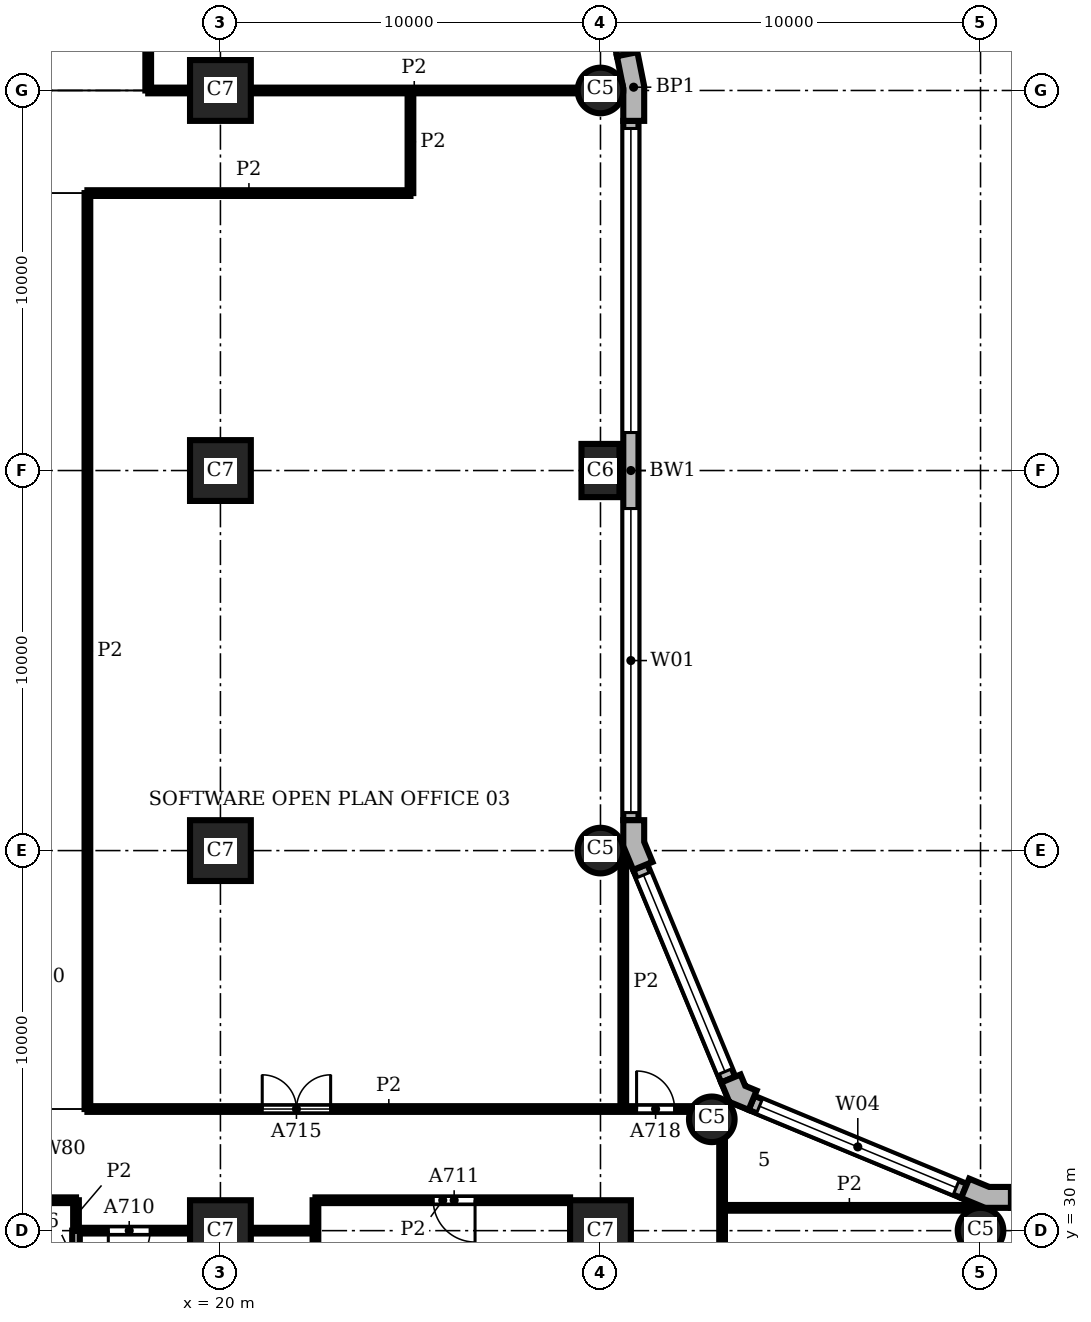
"""IFC4 building model, lengths in metres.
Left out: names, types, materials, properties, quantities, classifications, styles, units other than length and angle.
Written with IfcOpenShell. Run it as: python <this file> out.ifc"""

import sys

from ifc_helpers import new_model, si_unit, direction, frame, frame_2d, origin, origin_2d, place, context, subcontext, project, spatial, polyline, rectangle, circle, outline, extrude, element, fill, save


model = new_model("IFC4")
c1 = context("Model", 3, precision=1e-05, world=origin(), true_north=direction((0.0, 1.0)))
c2 = subcontext(c1, "Body", "Model", "MODEL_VIEW")
j1 = project(units=[si_unit("LENGTHUNIT", "METRE"), si_unit("PLANEANGLEUNIT", "RADIAN")], contexts=[c1])
p1 = place(None, origin())
s1 = spatial("IfcSite", under=j1, at=p1, CompositionType="ELEMENT")
p2 = place(p1, origin())
s2 = spatial("IfcBuilding", under=s1, at=p2, CompositionType="ELEMENT")
p3 = place(p2, frame((0.0, 0.0, 86.1)))
s3 = spatial("IfcBuildingStorey", under=s2, at=p3, CompositionType="ELEMENT", Elevation=86.1)
for number, where, z_axis, x_axis in (
    (1, (40.0, 30.0, 0.0), (0.0, 0.0, 1.0), (1.0, 0.0, 0.0)),
    (2, (32.929, 32.929, 0.0), (0.0, 0.0, 1.0), (1.0, 0.0, 0.0)),
    (3, (30.0, 40.0, 0.0), (0.0, 0.0, 1.0), (1.0, 0.0, 0.0)),
):
    element("IfcColumn", number, at=place(p3, frame(where, z_axis=z_axis, x_axis=x_axis)), inside=s3, PredefinedType="COLUMN", context=c2, shape_type="SweptSolid", body=[
        extrude(circle(Radius=0.6, at=origin_2d()), origin(), (0.0, 0.0, 1.0), 3.9),
    ])
p4 = place(p3, frame((30.0, 50.0, 0.0), z_axis=(0.0, 0.0, 1.0), x_axis=(0.0, 1.0, 0.0)))
e4 = element("IfcColumn", 4, at=p4, inside=s3, PredefinedType="COLUMN", context=c2, shape_type="SweptSolid", body=[
    extrude(rectangle(XDim=1.4, YDim=1.0, at=origin_2d()), origin(), (0.0, 0.0, 1.0), 3.9),
])
p5 = place(p3, frame((30.0, 60.0, 0.0), z_axis=(0.0, 0.0, 1.0), x_axis=(1.0, 0.0, 0.0)))
e5 = element("IfcColumn", 5, at=p5, inside=s3, PredefinedType="COLUMN", context=c2, shape_type="SweptSolid", body=[
    extrude(circle(Radius=0.6, at=origin_2d()), origin(), (0.0, 0.0, 1.0), 3.9),
])
for number, where, z_axis, x_axis in (
    (6, (20.0, 30.0, 0.0), (0.0, 0.0, 1.0), (1.0, 0.0, 0.0)),
    (7, (20.0, 40.0, 0.0), (0.0, 0.0, 1.0), (1.0, 0.0, 0.0)),
    (8, (20.0, 50.0, 0.0), (0.0, 0.0, 1.0), (1.0, 0.0, 0.0)),
    (9, (20.0, 60.0, 0.0), (0.0, 0.0, 1.0), (1.0, 0.0, 0.0)),
    (10, (30.0, 30.0, 0.0), (0.0, 0.0, 1.0), (1.0, 0.0, 0.0)),
):
    element("IfcColumn", number, at=place(p3, frame(where, z_axis=z_axis, x_axis=x_axis)), inside=s3, PredefinedType="COLUMN", context=c2, shape_type="SweptSolid", body=[
        extrude(rectangle(XDim=1.6, YDim=1.6, at=origin_2d()), origin(), (0.0, 0.0, 1.0), 3.9),
    ])
p6 = place(p3, origin())
e11 = element("IfcWall", 11, at=p6, inside=s3, PredefinedType="SOLIDWALL", context=c2, shape_type="SweptSolid", body=[
    extrude(outline(polyline([(40.8, 31.0), (40.8, 31.15), (40.229, 31.15), (39.701, 31.369), (39.644, 31.23), (39.49, 30.861), (40.119, 30.6), (40.8, 30.6), (40.8, 31.0)])), origin(), (0.0, 0.0, 1.0), 3.9),
])
e12 = element("IfcWall", 12, at=p6, inside=s3, PredefinedType="SOLIDWALL", context=c2, shape_type="SweptSolid", body=[
    extrude(outline(polyline([(34.051, 33.547), (34.108, 33.685), (33.809, 33.809), (33.685, 34.108), (33.547, 34.051), (33.177, 33.898), (33.388, 33.388), (33.898, 33.177), (34.051, 33.547)])), origin(), (0.0, 0.0, 1.0), 3.9),
])
e13 = element("IfcWall", 13, at=p6, inside=s3, PredefinedType="SOLIDWALL", context=c2, shape_type="SweptSolid", body=[
    extrude(outline(polyline([(31.23, 39.644), (31.369, 39.701), (31.15, 40.229), (31.15, 40.8), (31.0, 40.8), (30.6, 40.8), (30.6, 40.119), (30.861, 39.49), (31.23, 39.644)])), origin(), (0.0, 0.0, 1.0), 3.9),
])
e14 = element("IfcWall", 14, at=p6, inside=s3, PredefinedType="SOLIDWALL", context=c2, shape_type="SweptSolid", body=[
    extrude(outline(polyline([(31.0, 59.2), (31.15, 59.2), (31.15, 60.113), (30.972, 61.009), (30.825, 60.98), (30.432, 60.902), (30.6, 60.059), (30.6, 59.2), (31.0, 59.2)])), origin(), (0.0, 0.0, 1.0), 3.9),
])
p7 = place(p3, frame((69.2, 30.8, 0.0), z_axis=(0.0, 0.0, 1.0), x_axis=(-1.0, 0.0, 0.0)))
e15 = element("IfcWall", 15, at=p7, inside=s3, PredefinedType="SOLIDWALL", context=c2, shape_type="SweptSolid", body=[
    extrude(rectangle(XDim=28.4, YDim=0.4, at=frame_2d((14.2, 0.0))), origin(), (0.0, 0.0, 1.0), 3.9),
])
p8 = place(p7, frame((0.2, 0.0, 0.9)))
e16 = element("IfcOpeningElement", 16, at=p8, cuts=e15, PredefinedType="OPENING", context=c2, shape_type="SweptSolid", body=[
    extrude(rectangle(XDim=8.0, YDim=2.35, at=frame_2d((4.0, 1.175))), frame((0.0, 0.21, 0.0), z_axis=(0.0, -1.0, 0.0), x_axis=(1.0, 0.0, 0.0)), (0.0, 0.0, 1.0), 0.42),
])
p9 = place(p7, frame((10.2, 0.0, 0.9)))
e17 = element("IfcOpeningElement", 17, at=p9, cuts=e15, PredefinedType="OPENING", context=c2, shape_type="SweptSolid", body=[
    extrude(rectangle(XDim=8.0, YDim=2.35, at=frame_2d((4.0, 1.175))), frame((0.0, 0.21, 0.0), z_axis=(0.0, -1.0, 0.0), x_axis=(1.0, 0.0, 0.0)), (0.0, 0.0, 1.0), 0.42),
])
p10 = place(p7, frame((20.2, 0.0, 0.9)))
e18 = element("IfcOpeningElement", 18, at=p10, cuts=e15, PredefinedType="OPENING", context=c2, shape_type="SweptSolid", body=[
    extrude(rectangle(XDim=8.0, YDim=2.35, at=frame_2d((4.0, 1.175))), frame((0.0, 0.21, 0.0), z_axis=(0.0, -1.0, 0.0), x_axis=(1.0, 0.0, 0.0)), (0.0, 0.0, 1.0), 0.42),
])
p11 = place(p3, frame((39.567, 31.045, 0.0), z_axis=(0.0, 0.0, 1.0), x_axis=(-0.923891000409, 0.382655745237, 0.0)))
e19 = element("IfcWall", 19, at=p11, inside=s3, PredefinedType="SOLIDWALL", context=c2, shape_type="SweptSolid", body=[
    extrude(rectangle(XDim=6.053, YDim=0.4, at=frame_2d((3.027, 0.0))), origin(), (0.0, 0.0, 1.0), 3.9),
])
p12 = place(p11, frame((0.227, 0.0, 0.9)))
e20 = element("IfcOpeningElement", 20, at=p12, cuts=e19, PredefinedType="OPENING", context=c2, shape_type="SweptSolid", body=[
    extrude(rectangle(XDim=5.6, YDim=2.35, at=frame_2d((2.8, 1.175))), frame((0.0, 0.21, 0.0), z_axis=(0.0, -1.0, 0.0), x_axis=(1.0, 0.0, 0.0)), (0.0, 0.0, 1.0), 0.42),
])
p13 = place(p3, frame((33.362, 33.974, 0.0), z_axis=(0.0, 0.0, 1.0), x_axis=(-0.382655745237, 0.923891000409, 0.0)))
e21 = element("IfcWall", 21, at=p13, inside=s3, PredefinedType="SOLIDWALL", context=c2, shape_type="SweptSolid", body=[
    extrude(rectangle(XDim=6.053, YDim=0.4, at=frame_2d((3.027, 0.0))), origin(), (0.0, 0.0, 1.0), 3.9),
])
p14 = place(p13, frame((0.227, 0.0, 0.9)))
e22 = element("IfcOpeningElement", 22, at=p14, cuts=e21, PredefinedType="OPENING", context=c2, shape_type="SweptSolid", body=[
    extrude(rectangle(XDim=5.6, YDim=2.35, at=frame_2d((2.8, 1.175))), frame((0.0, 0.21, 0.0), z_axis=(0.0, -1.0, 0.0), x_axis=(1.0, 0.0, 0.0)), (0.0, 0.0, 1.0), 0.42),
])
p15 = place(p3, frame((30.8, 40.8, 0.0), z_axis=(0.0, 0.0, 1.0), x_axis=(0.0, 1.0, 0.0)))
e23 = element("IfcWall", 23, at=p15, inside=s3, PredefinedType="SOLIDWALL", context=c2, shape_type="SweptSolid", body=[
    extrude(rectangle(XDim=18.4, YDim=0.4, at=frame_2d((9.2, 0.0))), origin(), (0.0, 0.0, 1.0), 3.9),
])
p16 = place(p15, frame((0.2, 0.0, 0.9)))
e24 = element("IfcOpeningElement", 24, at=p16, cuts=e23, PredefinedType="OPENING", context=c2, shape_type="SweptSolid", body=[
    extrude(rectangle(XDim=8.0, YDim=2.35, at=frame_2d((4.0, 1.175))), frame((0.0, 0.21, 0.0), z_axis=(0.0, -1.0, 0.0), x_axis=(1.0, 0.0, 0.0)), (0.0, 0.0, 1.0), 0.42),
])
p17 = place(p15, frame((10.2, 0.0, 0.9)))
e25 = element("IfcOpeningElement", 25, at=p17, cuts=e23, PredefinedType="OPENING", context=c2, shape_type="SweptSolid", body=[
    extrude(rectangle(XDim=8.0, YDim=2.35, at=frame_2d((4.0, 1.175))), frame((0.0, 0.21, 0.0), z_axis=(0.0, -1.0, 0.0), x_axis=(1.0, 0.0, 0.0)), (0.0, 0.0, 1.0), 0.42),
])
p18 = place(p3, frame((30.629, 60.941, 0.0), z_axis=(0.0, 0.0, 1.0), x_axis=(-0.195098533057, 0.98078364709, 0.0)))
e26 = element("IfcWall", 26, at=p18, inside=s3, PredefinedType="SOLIDWALL", context=c2, shape_type="SweptSolid", body=[
    extrude(rectangle(XDim=4.753, YDim=0.4, at=frame_2d((2.376, 0.0))), origin(), (0.0, 0.0, 1.0), 3.9),
])
p19 = place(p18, frame((0.226, 0.0, 0.9)))
e27 = element("IfcOpeningElement", 27, at=p19, cuts=e26, PredefinedType="OPENING", context=c2, shape_type="SweptSolid", body=[
    extrude(rectangle(XDim=4.3, YDim=2.35, at=frame_2d((2.15, 1.175))), frame((0.0, 0.21, 0.0), z_axis=(0.0, -1.0, 0.0), x_axis=(1.0, 0.0, 0.0)), (0.0, 0.0, 1.0), 0.42),
])
p20 = place(p3, frame((16.2, 30.0, 0.0), z_axis=(0.0, 0.0, 1.0), x_axis=(0.0, 1.0, 0.0)))
e28 = element("IfcWall", 28, at=p20, inside=s3, PredefinedType="PARTITIONING", context=c2, shape_type="SweptSolid", body=[
    extrude(rectangle(XDim=0.8, YDim=0.15, at=frame_2d((0.4, 0.0))), origin(), (0.0, 0.0, 1.0), 3.58),
])
p21 = place(p3, frame((16.5, 33.2, 0.0), z_axis=(0.0, 0.0, 1.0), x_axis=(0.0, 1.0, 0.0)))
e29 = element("IfcWall", 29, at=p21, inside=s3, PredefinedType="PARTITIONING", context=c2, shape_type="SweptSolid", body=[
    extrude(rectangle(XDim=24.1, YDim=0.15, at=frame_2d((12.05, 0.0))), origin(), (0.0, 0.0, 1.0), 3.58),
])
p22 = place(p3, frame((18.1, 60.0, 0.0), z_axis=(0.0, 0.0, 1.0), x_axis=(0.0, 1.0, 0.0)))
e30 = element("IfcWall", 30, at=p22, inside=s3, PredefinedType="PARTITIONING", context=c2, shape_type="SweptSolid", body=[
    extrude(rectangle(XDim=6.4, YDim=0.15, at=frame_2d((3.2, 0.0))), origin(), (0.0, 0.0, 1.0), 3.58),
])
p23 = place(p22, frame((1.85, 0.0, 0.0)))
e31 = element("IfcOpeningElement", 31, at=p23, cuts=e30, PredefinedType="OPENING", context=c2, shape_type="SweptSolid", body=[
    extrude(rectangle(XDim=1.8, YDim=2.1, at=frame_2d((0.9, 1.05))), frame((0.0, 0.085, 0.0), z_axis=(0.0, -1.0, 0.0), x_axis=(1.0, 0.0, 0.0)), (0.0, 0.0, 1.0), 0.17),
])
p24 = place(p3, frame((22.5, 28.0, 0.0), z_axis=(0.0, 0.0, 1.0), x_axis=(0.0, 1.0, 0.0)))
e32 = element("IfcWall", 32, at=p24, inside=s3, PredefinedType="PARTITIONING", context=c2, shape_type="SweptSolid", body=[
    extrude(rectangle(XDim=2.8, YDim=0.15, at=frame_2d((1.4, 0.0))), origin(), (0.0, 0.0, 1.0), 3.58),
])
p25 = place(p3, frame((25.0, 57.3, 0.0), z_axis=(0.0, 0.0, 1.0), x_axis=(0.0, 1.0, 0.0)))
e33 = element("IfcWall", 33, at=p25, inside=s3, PredefinedType="PARTITIONING", context=c2, shape_type="SweptSolid", body=[
    extrude(rectangle(XDim=2.7, YDim=0.15, at=frame_2d((1.35, 0.0))), origin(), (0.0, 0.0, 1.0), 3.58),
])
p26 = place(p3, frame((30.6, 33.2, 0.0), z_axis=(0.0, 0.0, 1.0), x_axis=(0.0, 1.0, 0.0)))
e34 = element("IfcWall", 34, at=p26, inside=s3, PredefinedType="PARTITIONING", context=c2, shape_type="SweptSolid", body=[
    extrude(rectangle(XDim=6.699, YDim=0.15, at=frame_2d((3.35, 0.0))), origin(), (0.0, 0.0, 1.0), 3.58),
])
p27 = place(p3, frame((33.2, 15.45, 0.0), z_axis=(0.0, 0.0, 1.0), x_axis=(0.0, 1.0, 0.0)))
e35 = element("IfcWall", 35, at=p27, inside=s3, PredefinedType="PARTITIONING", context=c2, shape_type="SweptSolid", body=[
    extrude(rectangle(XDim=16.912, YDim=0.15, at=frame_2d((8.456, 0.0))), origin(), (0.0, 0.0, 1.0), 3.58),
])
p28 = place(p27, frame((11.35, 0.0, 0.0)))
e36 = element("IfcOpeningElement", 36, at=p28, cuts=e35, PredefinedType="OPENING", context=c2, shape_type="SweptSolid", body=[
    extrude(rectangle(XDim=1.8, YDim=2.1, at=frame_2d((0.9, 1.05))), frame((0.0, 0.085, 0.0), z_axis=(0.0, -1.0, 0.0), x_axis=(1.0, 0.0, 0.0)), (0.0, 0.0, 1.0), 0.17),
])
p29 = place(p27, frame((3.35, 0.0, 0.0)))
e37 = element("IfcOpeningElement", 37, at=p29, cuts=e35, PredefinedType="OPENING", context=c2, shape_type="SweptSolid", body=[
    extrude(rectangle(XDim=1.0, YDim=2.1, at=frame_2d((0.5, 1.05))), frame((0.0, 0.085, 0.0), z_axis=(0.0, -1.0, 0.0), x_axis=(1.0, 0.0, 0.0)), (0.0, 0.0, 1.0), 0.17),
])
p30 = place(p3, frame((16.2, 30.0, 0.0), z_axis=(0.0, 0.0, 1.0), x_axis=(1.0, 0.0, 0.0)))
e38 = element("IfcWall", 38, at=p30, inside=s3, PredefinedType="PARTITIONING", context=c2, shape_type="SweptSolid", body=[
    extrude(rectangle(XDim=3.0, YDim=0.15, at=frame_2d((1.5, 0.0))), origin(), (0.0, 0.0, 1.0), 3.58),
])
p31 = place(p30, frame((0.85, 0.0, 0.0)))
e39 = element("IfcOpeningElement", 39, at=p31, cuts=e38, PredefinedType="OPENING", context=c2, shape_type="SweptSolid", body=[
    extrude(rectangle(XDim=1.1, YDim=2.1, at=frame_2d((0.55, 1.05))), frame((0.0, 0.085, 0.0), z_axis=(0.0, -1.0, 0.0), x_axis=(1.0, 0.0, 0.0)), (0.0, 0.0, 1.0), 0.17),
])
p32 = place(p3, frame((20.8, 30.0, 0.0), z_axis=(0.0, 0.0, 1.0), x_axis=(1.0, 0.0, 0.0)))
e40 = element("IfcWall", 40, at=p32, inside=s3, PredefinedType="PARTITIONING", context=c2, shape_type="SweptSolid", body=[
    extrude(rectangle(XDim=1.7, YDim=0.15, at=frame_2d((0.85, 0.0))), origin(), (0.0, 0.0, 1.0), 3.58),
])
p33 = place(p3, frame((33.2, 30.6, 0.0), z_axis=(0.0, 0.0, 1.0), x_axis=(1.0, 0.0, 0.0)))
e41 = element("IfcWall", 41, at=p33, inside=s3, PredefinedType="PARTITIONING", context=c2, shape_type="SweptSolid", body=[
    extrude(rectangle(XDim=6.699, YDim=0.15, at=frame_2d((3.35, 0.0))), origin(), (0.0, 0.0, 1.0), 3.58),
])
p34 = place(p3, frame((13.8, 30.8, 0.0), z_axis=(0.0, 0.0, 1.0), x_axis=(1.0, 0.0, 0.0)))
e42 = element("IfcWall", 42, at=p34, inside=s3, PredefinedType="PARTITIONING", context=c2, shape_type="SweptSolid", body=[
    extrude(rectangle(XDim=2.4, YDim=0.15, at=frame_2d((1.2, 0.0))), origin(), (0.0, 0.0, 1.0), 3.58),
])
p35 = place(p3, frame((22.5, 30.8, 0.0), z_axis=(0.0, 0.0, 1.0), x_axis=(1.0, 0.0, 0.0)))
e43 = element("IfcWall", 43, at=p35, inside=s3, PredefinedType="PARTITIONING", context=c2, shape_type="SweptSolid", body=[
    extrude(rectangle(XDim=6.7, YDim=0.15, at=frame_2d((3.35, 0.0))), origin(), (0.0, 0.0, 1.0), 3.58),
])
p36 = place(p35, frame((3.1, 0.0, 0.0)))
e44 = element("IfcOpeningElement", 44, at=p36, cuts=e43, PredefinedType="OPENING", context=c2, shape_type="SweptSolid", body=[
    extrude(rectangle(XDim=1.1, YDim=2.1, at=frame_2d((0.55, 1.05))), frame((0.0, 0.085, 0.0), z_axis=(0.0, -1.0, 0.0), x_axis=(1.0, 0.0, 0.0)), (0.0, 0.0, 1.0), 0.17),
])
p37 = place(p3, frame((16.5, 33.2, 0.0), z_axis=(0.0, 0.0, 1.0), x_axis=(1.0, 0.0, 0.0)))
e45 = element("IfcWall", 45, at=p37, inside=s3, PredefinedType="PARTITIONING", context=c2, shape_type="SweptSolid", body=[
    extrude(rectangle(XDim=15.862, YDim=0.15, at=frame_2d((7.931, 0.0))), origin(), (0.0, 0.0, 1.0), 3.58),
])
p38 = place(p37, frame((4.6, 0.0, 0.0)))
e46 = element("IfcOpeningElement", 46, at=p38, cuts=e45, PredefinedType="OPENING", context=c2, shape_type="SweptSolid", body=[
    extrude(rectangle(XDim=1.8, YDim=2.1, at=frame_2d((0.9, 1.05))), frame((0.0, 0.085, 0.0), z_axis=(0.0, -1.0, 0.0), x_axis=(1.0, 0.0, 0.0)), (0.0, 0.0, 1.0), 0.17),
])
p39 = place(p37, frame((14.45, 0.0, 0.0)))
e47 = element("IfcOpeningElement", 47, at=p39, cuts=e45, PredefinedType="OPENING", context=c2, shape_type="SweptSolid", body=[
    extrude(rectangle(XDim=1.0, YDim=2.1, at=frame_2d((0.5, 1.05))), frame((0.0, 0.085, 0.0), z_axis=(0.0, -1.0, 0.0), x_axis=(1.0, 0.0, 0.0)), (0.0, 0.0, 1.0), 0.17),
])
p40 = place(p3, frame((16.5, 57.3, 0.0), z_axis=(0.0, 0.0, 1.0), x_axis=(1.0, 0.0, 0.0)))
e48 = element("IfcWall", 48, at=p40, inside=s3, PredefinedType="PARTITIONING", context=c2, shape_type="SweptSolid", body=[
    extrude(rectangle(XDim=8.5, YDim=0.15, at=frame_2d((4.25, 0.0))), origin(), (0.0, 0.0, 1.0), 3.58),
])
p41 = place(p3, frame((18.1, 60.0, 0.0), z_axis=(0.0, 0.0, 1.0), x_axis=(1.0, 0.0, 0.0)))
e49 = element("IfcWall", 49, at=p41, inside=s3, PredefinedType="PARTITIONING", context=c2, shape_type="SweptSolid", body=[
    extrude(rectangle(XDim=1.1, YDim=0.15, at=frame_2d((0.55, 0.0))), origin(), (0.0, 0.0, 1.0), 3.58),
])
p42 = place(p3, frame((20.8, 60.0, 0.0), z_axis=(0.0, 0.0, 1.0), x_axis=(1.0, 0.0, 0.0)))
e50 = element("IfcWall", 50, at=p42, inside=s3, PredefinedType="PARTITIONING", context=c2, shape_type="SweptSolid", body=[
    extrude(rectangle(XDim=8.6, YDim=0.15, at=frame_2d((4.3, 0.0))), origin(), (0.0, 0.0, 1.0), 3.58),
])
p43 = place(p3, frame((16.2, 28.0, 0.0), z_axis=(0.0, 0.0, 1.0), x_axis=(0.0, 1.0, 0.0)))
e51 = element("IfcWall", 51, at=p43, inside=s3, PredefinedType="PARTITIONING", context=c2, shape_type="SweptSolid", body=[
    extrude(rectangle(XDim=2.0, YDim=0.2, at=frame_2d((1.0, 0.0))), origin(), (0.0, 0.0, 1.0), 3.58),
])
p44 = place(p43, frame((0.625, 0.0, 0.0)))
e52 = element("IfcOpeningElement", 52, at=p44, cuts=e51, PredefinedType="OPENING", context=c2, shape_type="SweptSolid", body=[
    extrude(rectangle(XDim=0.95, YDim=2.1, at=frame_2d((0.475, 1.05))), frame((0.0, 0.11, 0.0), z_axis=(0.0, -1.0, 0.0), x_axis=(1.0, 0.0, 0.0)), (0.0, 0.0, 1.0), 0.22),
])
p45 = place(p12, origin())
e53 = element("IfcWindow", 53, at=p45, inside=s3, PartitioningType="SINGLE_PANEL", PredefinedType="WINDOW", context=c2, shape_type="SweptSolid", body=[
    extrude(rectangle(XDim=5.6, YDim=2.35, at=frame_2d((2.8, 1.175))), frame((0.0, 0.16, 0.0), z_axis=(0.0, -1.0, 0.0), x_axis=(1.0, 0.0, 0.0)), (0.0, 0.0, 1.0), 0.06),
])
fill(e20, e53)
p46 = place(p14, origin())
e54 = element("IfcWindow", 54, at=p46, inside=s3, PartitioningType="SINGLE_PANEL", PredefinedType="WINDOW", context=c2, shape_type="SweptSolid", body=[
    extrude(rectangle(XDim=5.6, YDim=2.35, at=frame_2d((2.8, 1.175))), frame((0.0, 0.16, 0.0), z_axis=(0.0, -1.0, 0.0), x_axis=(1.0, 0.0, 0.0)), (0.0, 0.0, 1.0), 0.06),
])
fill(e22, e54)
p47 = place(p16, origin())
e55 = element("IfcWindow", 55, at=p47, inside=s3, PartitioningType="SINGLE_PANEL", PredefinedType="WINDOW", context=c2, shape_type="SweptSolid", body=[
    extrude(rectangle(XDim=8.0, YDim=2.35, at=frame_2d((4.0, 1.175))), frame((0.0, 0.16, 0.0), z_axis=(0.0, -1.0, 0.0), x_axis=(1.0, 0.0, 0.0)), (0.0, 0.0, 1.0), 0.06),
])
fill(e24, e55)
p48 = place(p17, origin())
e56 = element("IfcWindow", 56, at=p48, inside=s3, PartitioningType="SINGLE_PANEL", PredefinedType="WINDOW", context=c2, shape_type="SweptSolid", body=[
    extrude(rectangle(XDim=8.0, YDim=2.35, at=frame_2d((4.0, 1.175))), frame((0.0, 0.16, 0.0), z_axis=(0.0, -1.0, 0.0), x_axis=(1.0, 0.0, 0.0)), (0.0, 0.0, 1.0), 0.06),
])
fill(e25, e56)
p49 = place(p31, frame((1.1, 0.0, 0.0), z_axis=(0.0, 0.0, 1.0), x_axis=(-1.0, 0.0, 0.0)))
e57 = element("IfcDoor", 57, at=p49, inside=s3, OperationType="SINGLE_SWING_RIGHT", PredefinedType="DOOR", context=c2, shape_type="SweptSolid", body=[
    extrude(rectangle(XDim=1.1, YDim=2.1, at=frame_2d((0.55, 1.05))), frame((0.0, 0.025, 0.0), z_axis=(0.0, -1.0, 0.0), x_axis=(1.0, 0.0, 0.0)), (0.0, 0.0, 1.0), 0.05),
])
fill(e39, e57)
p50 = place(p36, frame((1.1, 0.0, 0.0), z_axis=(0.0, 0.0, 1.0), x_axis=(-1.0, 0.0, 0.0)))
e58 = element("IfcDoor", 58, at=p50, inside=s3, OperationType="SINGLE_SWING_LEFT", PredefinedType="DOOR", context=c2, shape_type="SweptSolid", body=[
    extrude(rectangle(XDim=1.1, YDim=2.1, at=frame_2d((0.55, 1.05))), frame((0.0, 0.025, 0.0), z_axis=(0.0, -1.0, 0.0), x_axis=(1.0, 0.0, 0.0)), (0.0, 0.0, 1.0), 0.05),
])
fill(e44, e58)
p51 = place(p38, origin())
e59 = element("IfcDoor", 59, at=p51, inside=s3, OperationType="DOUBLE_DOOR_SINGLE_SWING", PredefinedType="DOOR", context=c2, shape_type="SweptSolid", body=[
    extrude(rectangle(XDim=1.8, YDim=2.1, at=frame_2d((0.9, 1.05))), frame((0.0, 0.025, 0.0), z_axis=(0.0, -1.0, 0.0), x_axis=(1.0, 0.0, 0.0)), (0.0, 0.0, 1.0), 0.05),
])
fill(e46, e59)
p52 = place(p39, origin())
e60 = element("IfcDoor", 60, at=p52, inside=s3, OperationType="SINGLE_SWING_LEFT", PredefinedType="DOOR", context=c2, shape_type="SweptSolid", body=[
    extrude(rectangle(XDim=1.0, YDim=2.1, at=frame_2d((0.5, 1.05))), frame((0.0, 0.025, 0.0), z_axis=(0.0, -1.0, 0.0), x_axis=(1.0, 0.0, 0.0)), (0.0, 0.0, 1.0), 0.05),
])
fill(e47, e60)
save(model, sys.argv[1])
